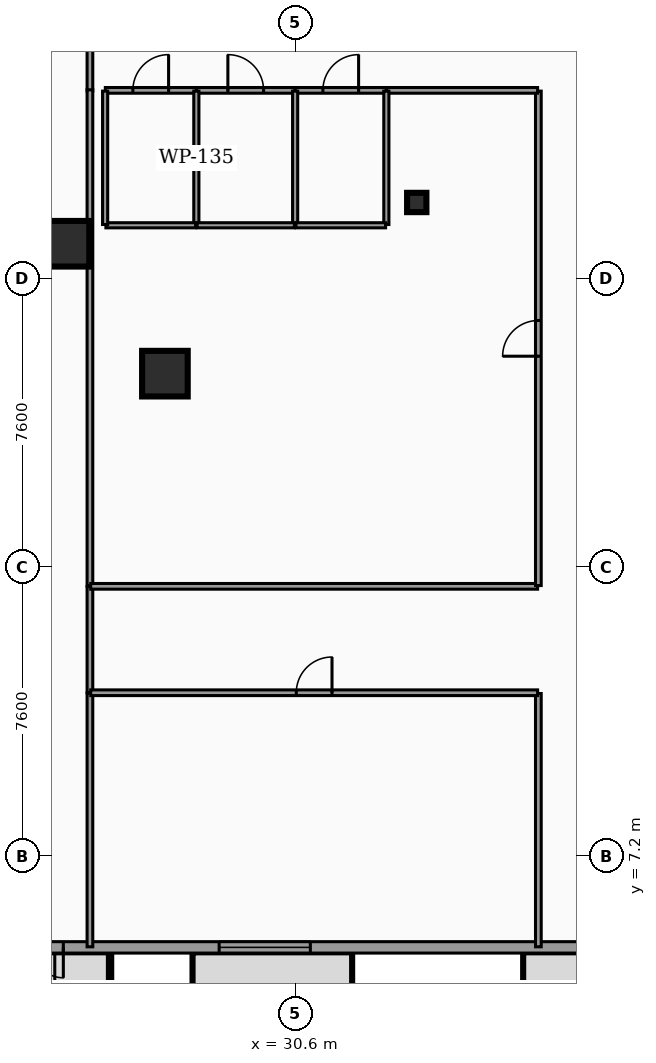
"""IFC4 building model, lengths in metres.
Left out: names, types, materials, properties, quantities, classifications, styles, units other than length and angle.
Written with IfcOpenShell. Run it as: python <this file> out.ifc"""

import sys

from ifc_helpers import new_model, si_unit, direction, frame, frame_2d, origin, origin_2d, place, context, subcontext, project, spatial, rectangle, hollow_rectangle, hollow_circle, extrude, element, fill, save


model = new_model("IFC4")
c1 = context("Model", 3, precision=1e-05, world=origin(), true_north=direction((0.0, 1.0)))
c2 = subcontext(c1, "Body", "Model", "MODEL_VIEW")
j1 = project(units=[si_unit("LENGTHUNIT", "METRE"), si_unit("PLANEANGLEUNIT", "RADIAN")], contexts=[c1])
p1 = place(None, origin())
s1 = spatial("IfcSite", under=j1, at=p1, CompositionType="ELEMENT")
p2 = place(p1, origin())
s2 = spatial("IfcBuilding", under=s1, at=p2, CompositionType="ELEMENT")
p3 = place(p2, origin())
s3 = spatial("IfcBuildingStorey", under=s2, at=p3, CompositionType="ELEMENT", Elevation=0.0)
for number, where, z_axis, x_axis in (
    (1, (24.583, 23.314, 0.0), (0.0, 0.0, 1.0), (1.0, 0.0, 0.0)),
    (2, (27.173, 19.896, 0.0), (0.0, 0.0, 1.0), (1.0, 0.0, 0.0)),
):
    element("IfcColumn", number, at=place(p3, frame(where, z_axis=z_axis, x_axis=x_axis)), inside=s3, PredefinedType="COLUMN", context=c2, shape_type="SweptSolid", body=[
        extrude(hollow_rectangle(XDim=1.2, YDim=1.2, WallThickness=0.06, at=origin_2d()), origin(), (0.0, 0.0, 1.0), 4.82),
    ])
p4 = place(p3, frame((33.8, 24.4, 0.0), z_axis=(0.0, 0.0, 1.0), x_axis=(1.0, 0.0, 0.0)))
e3 = element("IfcColumn", 3, at=p4, inside=s3, PredefinedType="COLUMN", context=c2, shape_type="SweptSolid", body=[
    extrude(hollow_circle(Radius=0.254, WallThickness=0.02, at=origin_2d()), origin(), (0.0, 0.0, 1.0), 4.82),
])
p5 = place(p3, frame((75.1, 4.8, 0.0), z_axis=(0.0, 0.0, 1.0), x_axis=(-1.0, 0.0, 0.0)))
e4 = element("IfcWall", 4, at=p5, inside=s3, PredefinedType="STANDARD", context=c2, shape_type="SweptSolid", body=[
    extrude(rectangle(XDim=73.4, YDim=0.3, at=frame_2d((36.7, 0.0))), origin(), (0.0, 0.0, 1.0), 4.205),
])
p6 = place(p5, frame((65.3, 0.0, 0.0)))
e5 = element("IfcOpeningElement", 5, at=p6, cuts=e4, PredefinedType="OPENING", context=c2, shape_type="SweptSolid", body=[
    extrude(rectangle(XDim=4.4, YDim=3.5, at=frame_2d((2.2, 1.75))), frame((0.0, 0.16, 0.0), z_axis=(0.0, -1.0, 0.0), x_axis=(1.0, 0.0, 0.0)), (0.0, 0.0, 1.0), 0.32),
])
p7 = place(p5, frame((31.15, 0.0, 0.0)))
e6 = element("IfcOpeningElement", 6, at=p7, cuts=e4, PredefinedType="OPENING", context=c2, shape_type="SweptSolid", body=[
    extrude(rectangle(XDim=2.4, YDim=2.6, at=frame_2d((1.2, 1.3))), frame((0.0, 0.16, 0.0), z_axis=(0.0, -1.0, 0.0), x_axis=(1.0, 0.0, 0.0)), (0.0, 0.0, 1.0), 0.32),
])
p8 = place(p5, frame((50.6, 0.0, 0.0)))
e7 = element("IfcOpeningElement", 7, at=p8, cuts=e4, PredefinedType="OPENING", context=c2, shape_type="SweptSolid", body=[
    extrude(rectangle(XDim=1.6, YDim=2.4, at=frame_2d((0.8, 1.2))), frame((0.0, 0.16, 0.0), z_axis=(0.0, -1.0, 0.0), x_axis=(1.0, 0.0, 0.0)), (0.0, 0.0, 1.0), 0.32),
])
p9 = place(p5, frame((23.0, 0.0, 0.0)))
e8 = element("IfcOpeningElement", 8, at=p9, cuts=e4, PredefinedType="OPENING", context=c2, shape_type="SweptSolid", body=[
    extrude(rectangle(XDim=1.6, YDim=2.4, at=frame_2d((0.8, 1.2))), frame((0.0, 0.16, 0.0), z_axis=(0.0, -1.0, 0.0), x_axis=(1.0, 0.0, 0.0)), (0.0, 0.0, 1.0), 0.32),
])
p10 = place(p5, frame((7.6, 0.0, 0.0)))
e9 = element("IfcOpeningElement", 9, at=p10, cuts=e4, PredefinedType="OPENING", context=c2, shape_type="SweptSolid", body=[
    extrude(rectangle(XDim=1.8, YDim=2.4, at=frame_2d((0.9, 1.2))), frame((0.0, 0.16, 0.0), z_axis=(0.0, -1.0, 0.0), x_axis=(1.0, 0.0, 0.0)), (0.0, 0.0, 1.0), 0.32),
])
p11 = place(p5, frame((17.1, 0.0, 0.0)))
e10 = element("IfcOpeningElement", 10, at=p11, cuts=e4, PredefinedType="OPENING", context=c2, shape_type="SweptSolid", body=[
    extrude(rectangle(XDim=1.8, YDim=2.4, at=frame_2d((0.9, 1.2))), frame((0.0, 0.16, 0.0), z_axis=(0.0, -1.0, 0.0), x_axis=(1.0, 0.0, 0.0)), (0.0, 0.0, 1.0), 0.32),
])
p12 = place(p5, frame((59.75, 0.0, 0.0)))
e11 = element("IfcOpeningElement", 11, at=p12, cuts=e4, PredefinedType="OPENING", context=c2, shape_type="SweptSolid", body=[
    extrude(rectangle(XDim=1.8, YDim=2.4, at=frame_2d((0.9, 1.2))), frame((0.0, 0.16, 0.0), z_axis=(0.0, -1.0, 0.0), x_axis=(1.0, 0.0, 0.0)), (0.0, 0.0, 1.0), 0.32),
])
p13 = place(p5, frame((13.6, 0.0, 0.9)))
e12 = element("IfcOpeningElement", 12, at=p13, cuts=e4, PredefinedType="OPENING", context=c2, shape_type="SweptSolid", body=[
    extrude(rectangle(XDim=2.4, YDim=2.5, at=frame_2d((1.2, 1.25))), frame((0.0, 0.16, 0.0), z_axis=(0.0, -1.0, 0.0), x_axis=(1.0, 0.0, 0.0)), (0.0, 0.0, 1.0), 0.32),
])
p14 = place(p5, frame((28.15, 0.0, 0.9)))
e13 = element("IfcOpeningElement", 13, at=p14, cuts=e4, PredefinedType="OPENING", context=c2, shape_type="SweptSolid", body=[
    extrude(rectangle(XDim=2.4, YDim=2.5, at=frame_2d((1.2, 1.25))), frame((0.0, 0.16, 0.0), z_axis=(0.0, -1.0, 0.0), x_axis=(1.0, 0.0, 0.0)), (0.0, 0.0, 1.0), 0.32),
])
p15 = place(p5, frame((44.1, 0.0, 0.9)))
e14 = element("IfcOpeningElement", 14, at=p15, cuts=e4, PredefinedType="OPENING", context=c2, shape_type="SweptSolid", body=[
    extrude(rectangle(XDim=2.4, YDim=2.5, at=frame_2d((1.2, 1.25))), frame((0.0, 0.16, 0.0), z_axis=(0.0, -1.0, 0.0), x_axis=(1.0, 0.0, 0.0)), (0.0, 0.0, 1.0), 0.32),
])
p16 = place(p3, frame((25.2, 27.335, 0.0), z_axis=(0.0, 0.0, 1.0), x_axis=(0.0, 1.0, 0.0)))
e15 = element("IfcWall", 15, at=p16, inside=s3, PredefinedType="PARTITIONING", context=c2, shape_type="SweptSolid", body=[
    extrude(rectangle(XDim=2.795, YDim=0.15, at=frame_2d((1.397, 0.0))), origin(), (0.0, 0.0, 1.0), 3.777),
])
p17 = place(p3, frame((25.2, 11.505, 0.0), z_axis=(0.0, 0.0, 1.0), x_axis=(0.0, 1.0, 0.0)))
e16 = element("IfcWall", 16, at=p17, inside=s3, PredefinedType="PARTITIONING", context=c2, shape_type="SweptSolid", body=[
    extrude(rectangle(XDim=2.79, YDim=0.15, at=frame_2d((1.395, 0.0))), origin(), (0.0, 0.0, 1.0), 3.777),
])
p18 = place(p3, frame((25.2, 4.815, 0.0), z_axis=(0.0, 0.0, 1.0), x_axis=(0.0, 1.0, 0.0)))
e17 = element("IfcWall", 17, at=p18, inside=s3, PredefinedType="PARTITIONING", context=c2, shape_type="SweptSolid", body=[
    extrude(rectangle(XDim=6.68, YDim=0.15, at=frame_2d((3.34, 0.0))), origin(), (0.0, 0.0, 1.0), 3.777),
])
p19 = place(p3, frame((25.2, 14.305, 0.0), z_axis=(0.0, 0.0, 1.0), x_axis=(0.0, 1.0, 0.0)))
e18 = element("IfcWall", 18, at=p19, inside=s3, PredefinedType="PARTITIONING", context=c2, shape_type="SweptSolid", body=[
    extrude(rectangle(XDim=13.06, YDim=0.15, at=frame_2d((6.53, 0.0))), origin(), (0.0, 0.0, 1.0), 3.777),
])
p20 = place(p3, frame((25.605, 27.35, 0.0), z_axis=(0.0, 0.0, 1.0), x_axis=(1.0, 0.0, 0.0)))
e19 = element("IfcWall", 19, at=p20, inside=s3, PredefinedType="PARTITIONING", context=c2, shape_type="SweptSolid", body=[
    extrude(rectangle(XDim=2.39, YDim=0.15, at=frame_2d((1.195, 0.0))), origin(), (0.0, 0.0, 1.0), 3.777),
])
p21 = place(p20, frame((0.725, 0.0, 0.0)))
e20 = element("IfcOpeningElement", 20, at=p21, cuts=e19, PredefinedType="OPENING", context=c2, shape_type="SweptSolid", body=[
    extrude(rectangle(XDim=0.94, YDim=2.05, at=frame_2d((0.47, 1.025))), frame((0.0, 0.085, 0.0), z_axis=(0.0, -1.0, 0.0), x_axis=(1.0, 0.0, 0.0)), (0.0, 0.0, 1.0), 0.17),
])
p22 = place(p3, frame((28.005, 27.35, 0.0), z_axis=(0.0, 0.0, 1.0), x_axis=(1.0, 0.0, 0.0)))
e21 = element("IfcWall", 21, at=p22, inside=s3, PredefinedType="PARTITIONING", context=c2, shape_type="SweptSolid", body=[
    extrude(rectangle(XDim=2.59, YDim=0.15, at=frame_2d((1.295, 0.0))), origin(), (0.0, 0.0, 1.0), 3.777),
])
p23 = place(p22, frame((0.825, 0.0, 0.0)))
e22 = element("IfcOpeningElement", 22, at=p23, cuts=e21, PredefinedType="OPENING", context=c2, shape_type="SweptSolid", body=[
    extrude(rectangle(XDim=0.94, YDim=2.05, at=frame_2d((0.47, 1.025))), frame((0.0, 0.085, 0.0), z_axis=(0.0, -1.0, 0.0), x_axis=(1.0, 0.0, 0.0)), (0.0, 0.0, 1.0), 0.17),
])
p24 = place(p3, frame((30.605, 27.35, 0.0), z_axis=(0.0, 0.0, 1.0), x_axis=(1.0, 0.0, 0.0)))
e23 = element("IfcWall", 23, at=p24, inside=s3, PredefinedType="PARTITIONING", context=c2, shape_type="SweptSolid", body=[
    extrude(rectangle(XDim=2.39, YDim=0.15, at=frame_2d((1.195, 0.0))), origin(), (0.0, 0.0, 1.0), 3.777),
])
p25 = place(p24, frame((0.725, 0.0, 0.0)))
e24 = element("IfcOpeningElement", 24, at=p25, cuts=e23, PredefinedType="OPENING", context=c2, shape_type="SweptSolid", body=[
    extrude(rectangle(XDim=0.94, YDim=2.05, at=frame_2d((0.47, 1.025))), frame((0.0, 0.085, 0.0), z_axis=(0.0, -1.0, 0.0), x_axis=(1.0, 0.0, 0.0)), (0.0, 0.0, 1.0), 0.17),
])
p26 = place(p3, frame((37.0, 4.815, 0.0), z_axis=(0.0, 0.0, 1.0), x_axis=(0.0, 1.0, 0.0)))
e25 = element("IfcWall", 25, at=p26, inside=s3, PredefinedType="PARTITIONING", context=c2, shape_type="SweptSolid", body=[
    extrude(rectangle(XDim=6.665, YDim=0.15, at=frame_2d((3.333, 0.0))), origin(), (0.0, 0.0, 1.0), 3.777),
])
p27 = place(p3, frame((25.22, 11.5, 0.0), z_axis=(0.0, 0.0, 1.0), x_axis=(1.0, 0.0, 0.0)))
e26 = element("IfcWall", 26, at=p27, inside=s3, PredefinedType="PARTITIONING", context=c2, shape_type="SweptSolid", body=[
    extrude(rectangle(XDim=11.76, YDim=0.15, at=frame_2d((5.88, 0.0))), origin(), (0.0, 0.0, 1.0), 3.777),
])
p28 = place(p27, frame((5.41, 0.0, 0.0)))
e27 = element("IfcOpeningElement", 27, at=p28, cuts=e26, PredefinedType="OPENING", context=c2, shape_type="SweptSolid", body=[
    extrude(rectangle(XDim=0.94, YDim=2.05, at=frame_2d((0.47, 1.025))), frame((0.0, 0.085, 0.0), z_axis=(0.0, -1.0, 0.0), x_axis=(1.0, 0.0, 0.0)), (0.0, 0.0, 1.0), 0.17),
])
p29 = place(p3, frame((25.22, 14.3, 0.0), z_axis=(0.0, 0.0, 1.0), x_axis=(1.0, 0.0, 0.0)))
e28 = element("IfcWall", 28, at=p29, inside=s3, PredefinedType="PARTITIONING", context=c2, shape_type="SweptSolid", body=[
    extrude(rectangle(XDim=11.76, YDim=0.15, at=frame_2d((5.88, 0.0))), origin(), (0.0, 0.0, 1.0), 3.777),
])
p30 = place(p3, frame((37.0, 14.32, 0.0), z_axis=(0.0, 0.0, 1.0), x_axis=(0.0, 1.0, 0.0)))
e29 = element("IfcWall", 29, at=p30, inside=s3, PredefinedType="PARTITIONING", context=c2, shape_type="SweptSolid", body=[
    extrude(rectangle(XDim=13.01, YDim=0.15, at=frame_2d((6.505, 0.0))), origin(), (0.0, 0.0, 1.0), 3.777),
])
p31 = place(p30, frame((6.035, 0.0, 0.0)))
e30 = element("IfcOpeningElement", 30, at=p31, cuts=e29, PredefinedType="OPENING", context=c2, shape_type="SweptSolid", body=[
    extrude(rectangle(XDim=0.94, YDim=2.05, at=frame_2d((0.47, 1.025))), frame((0.0, 0.085, 0.0), z_axis=(0.0, -1.0, 0.0), x_axis=(1.0, 0.0, 0.0)), (0.0, 0.0, 1.0), 0.17),
])
p32 = place(p3, frame((33.005, 27.35, 0.0), z_axis=(0.0, 0.0, 1.0), x_axis=(1.0, 0.0, 0.0)))
e31 = element("IfcWall", 31, at=p32, inside=s3, PredefinedType="PARTITIONING", context=c2, shape_type="SweptSolid", body=[
    extrude(rectangle(XDim=3.975, YDim=0.15, at=frame_2d((1.988, 0.0))), origin(), (0.0, 0.0, 1.0), 3.777),
])
p33 = place(p3, frame((28.0, 23.82, 0.0), z_axis=(0.0, 0.0, 1.0), x_axis=(0.0, 1.0, 0.0)))
e32 = element("IfcWall", 32, at=p33, inside=s3, PredefinedType="PARTITIONING", context=c2, shape_type="SweptSolid", body=[
    extrude(rectangle(XDim=3.51, YDim=0.135, at=frame_2d((1.755, 0.0))), origin(), (0.0, 0.0, 1.0), 3.777),
])
p34 = place(p3, frame((25.62, 23.8, 0.0), z_axis=(0.0, 0.0, 1.0), x_axis=(1.0, 0.0, 0.0)))
e33 = element("IfcWall", 33, at=p34, inside=s3, PredefinedType="PARTITIONING", context=c2, shape_type="SweptSolid", body=[
    extrude(rectangle(XDim=2.36, YDim=0.135, at=frame_2d((1.18, 0.0))), origin(), (0.0, 0.0, 1.0), 3.777),
])
for number, where, z_axis, x_axis in (
    (34, (25.6, 23.82, 0.0), (0.0, 0.0, 1.0), (0.0, 1.0, 0.0)),
    (35, (30.6, 23.82, 0.0), (0.0, 0.0, 1.0), (0.0, 1.0, 0.0)),
):
    element("IfcWall", number, at=place(p3, frame(where, z_axis=z_axis, x_axis=x_axis)), inside=s3, PredefinedType="PARTITIONING", context=c2, shape_type="SweptSolid", body=[
        extrude(rectangle(XDim=3.51, YDim=0.135, at=frame_2d((1.755, 0.0))), origin(), (0.0, 0.0, 1.0), 3.777),
    ])
p35 = place(p3, frame((28.02, 23.8, 0.0), z_axis=(0.0, 0.0, 1.0), x_axis=(1.0, 0.0, 0.0)))
e36 = element("IfcWall", 36, at=p35, inside=s3, PredefinedType="PARTITIONING", context=c2, shape_type="SweptSolid", body=[
    extrude(rectangle(XDim=2.56, YDim=0.135, at=frame_2d((1.28, 0.0))), origin(), (0.0, 0.0, 1.0), 3.777),
])
p36 = place(p3, frame((33.0, 23.82, 0.0), z_axis=(0.0, 0.0, 1.0), x_axis=(0.0, 1.0, 0.0)))
e37 = element("IfcWall", 37, at=p36, inside=s3, PredefinedType="PARTITIONING", context=c2, shape_type="SweptSolid", body=[
    extrude(rectangle(XDim=3.51, YDim=0.135, at=frame_2d((1.755, 0.0))), origin(), (0.0, 0.0, 1.0), 3.777),
])
p37 = place(p3, frame((30.62, 23.8, 0.0), z_axis=(0.0, 0.0, 1.0), x_axis=(1.0, 0.0, 0.0)))
e38 = element("IfcWall", 38, at=p37, inside=s3, PredefinedType="PARTITIONING", context=c2, shape_type="SweptSolid", body=[
    extrude(rectangle(XDim=2.36, YDim=0.135, at=frame_2d((1.18, 0.0))), origin(), (0.0, 0.0, 1.0), 3.777),
])
p38 = place(p8, origin())
e39 = element("IfcDoor", 39, at=p38, inside=s3, OperationType="DOUBLE_DOOR_SINGLE_SWING", PredefinedType="DOOR", context=c2, shape_type="SweptSolid", body=[
    extrude(rectangle(XDim=1.6, YDim=2.4, at=frame_2d((0.8, 1.2))), frame((0.0, 0.025, 0.0), z_axis=(0.0, -1.0, 0.0), x_axis=(1.0, 0.0, 0.0)), (0.0, 0.0, 1.0), 0.05),
])
fill(e7, e39)
p39 = place(p15, origin())
e40 = element("IfcWindow", 40, at=p39, inside=s3, PartitioningType="SINGLE_PANEL", PredefinedType="WINDOW", context=c2, shape_type="SweptSolid", body=[
    extrude(rectangle(XDim=2.4, YDim=2.5, at=frame_2d((1.2, 1.25))), frame((0.0, 0.03, 0.0), z_axis=(0.0, -1.0, 0.0), x_axis=(1.0, 0.0, 0.0)), (0.0, 0.0, 1.0), 0.06),
])
fill(e14, e40)
p40 = place(p21, origin())
e41 = element("IfcDoor", 41, at=p40, inside=s3, OperationType="SINGLE_SWING_RIGHT", PredefinedType="DOOR", context=c2, shape_type="SweptSolid", body=[
    extrude(rectangle(XDim=0.94, YDim=2.05, at=frame_2d((0.47, 1.025))), frame((0.0, 0.025, 0.0), z_axis=(0.0, -1.0, 0.0), x_axis=(1.0, 0.0, 0.0)), (0.0, 0.0, 1.0), 0.05),
])
fill(e20, e41)
p41 = place(p23, origin())
e42 = element("IfcDoor", 42, at=p41, inside=s3, OperationType="SINGLE_SWING_LEFT", PredefinedType="DOOR", context=c2, shape_type="SweptSolid", body=[
    extrude(rectangle(XDim=0.94, YDim=2.05, at=frame_2d((0.47, 1.025))), frame((0.0, 0.025, 0.0), z_axis=(0.0, -1.0, 0.0), x_axis=(1.0, 0.0, 0.0)), (0.0, 0.0, 1.0), 0.05),
])
fill(e22, e42)
p42 = place(p25, origin())
e43 = element("IfcDoor", 43, at=p42, inside=s3, OperationType="SINGLE_SWING_RIGHT", PredefinedType="DOOR", context=c2, shape_type="SweptSolid", body=[
    extrude(rectangle(XDim=0.94, YDim=2.05, at=frame_2d((0.47, 1.025))), frame((0.0, 0.025, 0.0), z_axis=(0.0, -1.0, 0.0), x_axis=(1.0, 0.0, 0.0)), (0.0, 0.0, 1.0), 0.05),
])
fill(e24, e43)
p43 = place(p28, origin())
e44 = element("IfcDoor", 44, at=p43, inside=s3, OperationType="SINGLE_SWING_RIGHT", PredefinedType="DOOR", context=c2, shape_type="SweptSolid", body=[
    extrude(rectangle(XDim=0.94, YDim=2.05, at=frame_2d((0.47, 1.025))), frame((0.0, 0.025, 0.0), z_axis=(0.0, -1.0, 0.0), x_axis=(1.0, 0.0, 0.0)), (0.0, 0.0, 1.0), 0.05),
])
fill(e27, e44)
p44 = place(p31, origin())
e45 = element("IfcDoor", 45, at=p44, inside=s3, OperationType="SINGLE_SWING_LEFT", PredefinedType="DOOR", context=c2, shape_type="SweptSolid", body=[
    extrude(rectangle(XDim=0.94, YDim=2.05, at=frame_2d((0.47, 1.025))), frame((0.0, 0.025, 0.0), z_axis=(0.0, -1.0, 0.0), x_axis=(1.0, 0.0, 0.0)), (0.0, 0.0, 1.0), 0.05),
])
fill(e30, e45)
save(model, sys.argv[1])
